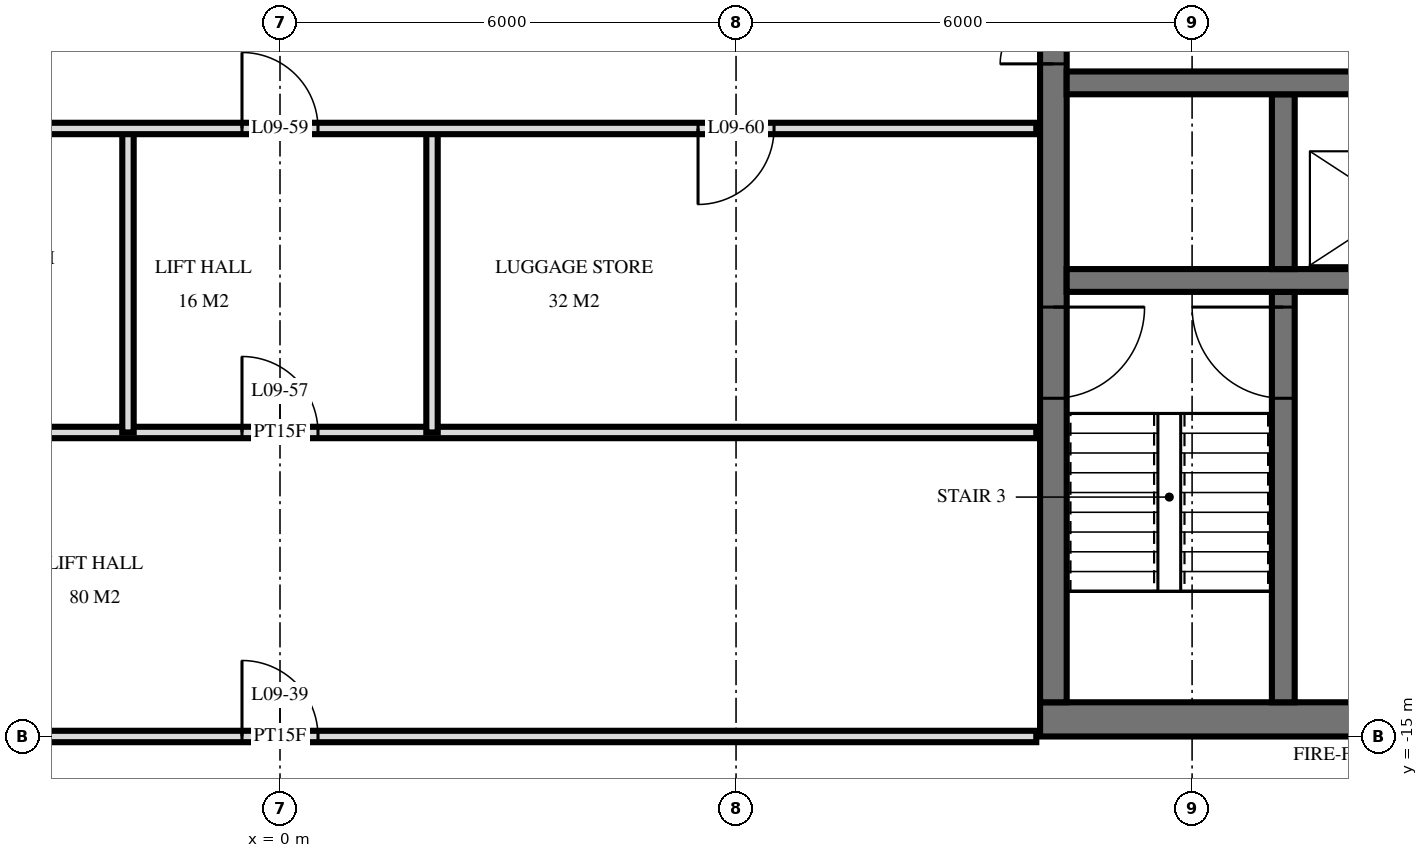
"""IFC4 building model, lengths in metres.
Left out: names, types, materials, properties, quantities, classifications, styles, units other than length and angle.
Written with IfcOpenShell. Run it as: python <this file> out.ifc"""

import sys

from ifc_helpers import new_model, si_unit, direction, frame, frame_2d, origin, place, context, subcontext, project, spatial, rectangle, extrude, element, fill, save


model = new_model("IFC4")
c1 = context("Model", 3, precision=1e-05, world=origin(), true_north=direction((0.0, 1.0)))
c2 = subcontext(c1, "Body", "Model", "MODEL_VIEW")
j1 = project(units=[si_unit("LENGTHUNIT", "METRE"), si_unit("PLANEANGLEUNIT", "RADIAN")], contexts=[c1])
p1 = place(None, origin())
s1 = spatial("IfcSite", under=j1, at=p1, CompositionType="ELEMENT")
p2 = place(p1, origin())
s2 = spatial("IfcBuilding", under=s1, at=p2, CompositionType="ELEMENT")
p3 = place(p2, frame((0.0, 0.0, 42.0)))
s3 = spatial("IfcBuildingStorey", under=s2, at=p3, CompositionType="ELEMENT", Elevation=42.0)
p4 = place(p3, frame((10.0, -14.775, 0.0), z_axis=(0.0, 0.0, 1.0), x_axis=(1.0, 0.0, 0.0)))
e1 = element("IfcWall", 1, at=p4, inside=s3, PredefinedType="SHEAR", context=c2, shape_type="SweptSolid", body=[
    extrude(rectangle(XDim=19.5, YDim=0.45, at=frame_2d((9.75, 0.0))), origin(), (0.0, 0.0, 1.0), 3.6),
])
p5 = place(p4, frame((7.1, 0.0, 0.0)))
e2 = element("IfcOpeningElement", 2, at=p5, cuts=e1, PredefinedType="OPENING", context=c2, shape_type="SweptSolid", body=[
    extrude(rectangle(XDim=1.2, YDim=2.1, at=frame_2d((0.6, 1.05))), frame((0.0, 0.235, 0.0), z_axis=(0.0, -1.0, 0.0), x_axis=(1.0, 0.0, 0.0)), (0.0, 0.0, 1.0), 0.47),
])
p6 = place(p4, frame((4.15, 0.0, 0.0)))
e3 = element("IfcOpeningElement", 3, at=p6, cuts=e1, PredefinedType="OPENING", context=c2, shape_type="SweptSolid", body=[
    extrude(rectangle(XDim=1.1, YDim=2.1, at=frame_2d((0.55, 1.05))), frame((0.0, 0.235, 0.0), z_axis=(0.0, -1.0, 0.0), x_axis=(1.0, 0.0, 0.0)), (0.0, 0.0, 1.0), 0.47),
])
p7 = place(p4, frame((10.1, 0.0, 0.0)))
e4 = element("IfcOpeningElement", 4, at=p7, cuts=e1, PredefinedType="OPENING", context=c2, shape_type="SweptSolid", body=[
    extrude(rectangle(XDim=0.9, YDim=2.1, at=frame_2d((0.45, 1.05))), frame((0.0, 0.235, 0.0), z_axis=(0.0, -1.0, 0.0), x_axis=(1.0, 0.0, 0.0)), (0.0, 0.0, 1.0), 0.47),
])
p8 = place(p4, frame((12.45, 0.0, 0.0)))
e5 = element("IfcOpeningElement", 5, at=p8, cuts=e1, PredefinedType="OPENING", context=c2, shape_type="SweptSolid", body=[
    extrude(rectangle(XDim=1.0, YDim=2.1, at=frame_2d((0.5, 1.05))), frame((0.0, 0.235, 0.0), z_axis=(0.0, -1.0, 0.0), x_axis=(1.0, 0.0, 0.0)), (0.0, 0.0, 1.0), 0.47),
])
p9 = place(p4, frame((14.913, 0.0, 0.0)))
e6 = element("IfcOpeningElement", 6, at=p9, cuts=e1, PredefinedType="OPENING", context=c2, shape_type="SweptSolid", body=[
    extrude(rectangle(XDim=1.0, YDim=2.1, at=frame_2d((0.5, 1.05))), frame((0.0, 0.235, 0.0), z_axis=(0.0, -1.0, 0.0), x_axis=(1.0, 0.0, 0.0)), (0.0, 0.0, 1.0), 0.47),
])
p10 = place(p4, frame((16.65, 0.0, 0.0)))
e7 = element("IfcOpeningElement", 7, at=p10, cuts=e1, PredefinedType="OPENING", context=c2, shape_type="SweptSolid", body=[
    extrude(rectangle(XDim=1.0, YDim=2.1, at=frame_2d((0.5, 1.05))), frame((0.0, 0.235, 0.0), z_axis=(0.0, -1.0, 0.0), x_axis=(1.0, 0.0, 0.0)), (0.0, 0.0, 1.0), 0.47),
])
p11 = place(p4, frame((18.025, 0.0, 0.0)))
e8 = element("IfcOpeningElement", 8, at=p11, cuts=e1, PredefinedType="OPENING", context=c2, shape_type="SweptSolid", body=[
    extrude(rectangle(XDim=1.0, YDim=2.1, at=frame_2d((0.5, 1.05))), frame((0.0, 0.235, 0.0), z_axis=(0.0, -1.0, 0.0), x_axis=(1.0, 0.0, 0.0)), (0.0, 0.0, 1.0), 0.47),
])
p12 = place(p3, frame((10.175, -14.55, 0.0), z_axis=(0.0, 0.0, 1.0), x_axis=(0.0, 1.0, 0.0)))
e9 = element("IfcWall", 9, at=p12, inside=s3, PredefinedType="SHEAR", context=c2, shape_type="SweptSolid", body=[
    extrude(rectangle(XDim=14.1, YDim=0.35, at=frame_2d((7.05, 0.0))), origin(), (0.0, 0.0, 1.0), 3.6),
])
p13 = place(p12, frame((8.4, 0.0, 0.0)))
e10 = element("IfcOpeningElement", 10, at=p13, cuts=e9, PredefinedType="OPENING", context=c2, shape_type="SweptSolid", body=[
    extrude(rectangle(XDim=1.4, YDim=2.4, at=frame_2d((0.7, 1.2))), frame((0.0, 0.185, 0.0), z_axis=(0.0, -1.0, 0.0), x_axis=(1.0, 0.0, 0.0)), (0.0, 0.0, 1.0), 0.37),
])
p14 = place(p12, frame((10.0, 0.0, 0.0)))
e11 = element("IfcOpeningElement", 11, at=p14, cuts=e9, PredefinedType="OPENING", context=c2, shape_type="SweptSolid", body=[
    extrude(rectangle(XDim=1.4, YDim=2.4, at=frame_2d((0.7, 1.2))), frame((0.0, 0.185, 0.0), z_axis=(0.0, -1.0, 0.0), x_axis=(1.0, 0.0, 0.0)), (0.0, 0.0, 1.0), 0.37),
])
p15 = place(p12, frame((4.0, 0.0, 0.0)))
e12 = element("IfcOpeningElement", 12, at=p15, cuts=e9, PredefinedType="OPENING", context=c2, shape_type="SweptSolid", body=[
    extrude(rectangle(XDim=1.2, YDim=2.1, at=frame_2d((0.6, 1.05))), frame((0.0, 0.185, 0.0), z_axis=(0.0, -1.0, 0.0), x_axis=(1.0, 0.0, 0.0)), (0.0, 0.0, 1.0), 0.37),
])
p16 = place(p3, frame((10.35, -6.4, 0.0), z_axis=(0.0, 0.0, 1.0), x_axis=(1.0, 0.0, 0.0)))
e13 = element("IfcWall", 13, at=p16, inside=s3, PredefinedType="SHEAR", context=c2, shape_type="SweptSolid", body=[
    extrude(rectangle(XDim=18.7, YDim=0.3, at=frame_2d((9.35, 0.0))), origin(), (0.0, 0.0, 1.0), 3.6),
])
p17 = place(p16, frame((14.65, 0.0, 0.0)))
e14 = element("IfcOpeningElement", 14, at=p17, cuts=e13, PredefinedType="OPENING", context=c2, shape_type="SweptSolid", body=[
    extrude(rectangle(XDim=1.1, YDim=2.1, at=frame_2d((0.55, 1.05))), frame((0.0, 0.16, 0.0), z_axis=(0.0, -1.0, 0.0), x_axis=(1.0, 0.0, 0.0)), (0.0, 0.0, 1.0), 0.32),
])
p18 = place(p16, frame((17.05, 0.0, 0.0)))
e15 = element("IfcOpeningElement", 15, at=p18, cuts=e13, PredefinedType="OPENING", context=c2, shape_type="SweptSolid", body=[
    extrude(rectangle(XDim=1.1, YDim=2.1, at=frame_2d((0.55, 1.05))), frame((0.0, 0.16, 0.0), z_axis=(0.0, -1.0, 0.0), x_axis=(1.0, 0.0, 0.0)), (0.0, 0.0, 1.0), 0.32),
])
p19 = place(p16, frame((6.8, 0.0, 0.0)))
e16 = element("IfcOpeningElement", 16, at=p19, cuts=e13, PredefinedType="OPENING", context=c2, shape_type="SweptSolid", body=[
    extrude(rectangle(XDim=1.1, YDim=2.1, at=frame_2d((0.55, 1.05))), frame((0.0, 0.16, 0.0), z_axis=(0.0, -1.0, 0.0), x_axis=(1.0, 0.0, 0.0)), (0.0, 0.0, 1.0), 0.32),
])
p20 = place(p16, frame((12.1, 0.0, 0.0)))
e17 = element("IfcOpeningElement", 17, at=p20, cuts=e13, PredefinedType="OPENING", context=c2, shape_type="SweptSolid", body=[
    extrude(rectangle(XDim=1.0, YDim=2.1, at=frame_2d((0.5, 1.05))), frame((0.0, 0.16, 0.0), z_axis=(0.0, -1.0, 0.0), x_axis=(1.0, 0.0, 0.0)), (0.0, 0.0, 1.0), 0.32),
])
p21 = place(p3, frame((10.35, -9.0, 0.0), z_axis=(0.0, 0.0, 1.0), x_axis=(1.0, 0.0, 0.0)))
e18 = element("IfcWall", 18, at=p21, inside=s3, PredefinedType="SHEAR", context=c2, shape_type="SweptSolid", body=[
    extrude(rectangle(XDim=18.7, YDim=0.3, at=frame_2d((9.35, 0.0))), origin(), (0.0, 0.0, 1.0), 3.6),
])
p22 = place(p21, frame((3.8, 0.0, 0.0)))
e19 = element("IfcOpeningElement", 19, at=p22, cuts=e18, PredefinedType="OPENING", context=c2, shape_type="SweptSolid", body=[
    extrude(rectangle(XDim=1.1, YDim=2.1, at=frame_2d((0.55, 1.05))), frame((0.0, 0.16, 0.0), z_axis=(0.0, -1.0, 0.0), x_axis=(1.0, 0.0, 0.0)), (0.0, 0.0, 1.0), 0.32),
])
p23 = place(p3, frame((13.2, -8.85, 0.0), z_axis=(0.0, 0.0, 1.0), x_axis=(0.0, 1.0, 0.0)))
e20 = element("IfcWall", 20, at=p23, inside=s3, PredefinedType="SHEAR", context=c2, shape_type="SweptSolid", body=[
    extrude(rectangle(XDim=2.3, YDim=0.3, at=frame_2d((1.15, 0.0))), origin(), (0.0, 0.0, 1.0), 3.6),
])
p24 = place(p3, frame((13.2, -14.55, 0.0), z_axis=(0.0, 0.0, 1.0), x_axis=(0.0, 1.0, 0.0)))
e21 = element("IfcWall", 21, at=p24, inside=s3, PredefinedType="SHEAR", context=c2, shape_type="SweptSolid", body=[
    extrude(rectangle(XDim=5.4, YDim=0.3, at=frame_2d((2.7, 0.0))), origin(), (0.0, 0.0, 1.0), 3.6),
])
p25 = place(p24, frame((4.0, 0.0, 0.0)))
e22 = element("IfcOpeningElement", 22, at=p25, cuts=e21, PredefinedType="OPENING", context=c2, shape_type="SweptSolid", body=[
    extrude(rectangle(XDim=1.2, YDim=2.1, at=frame_2d((0.6, 1.05))), frame((0.0, 0.16, 0.0), z_axis=(0.0, -1.0, 0.0), x_axis=(1.0, 0.0, 0.0)), (0.0, 0.0, 1.0), 0.32),
])
for number, where, z_axis, x_axis in (
    (23, (2.0, -11.0, 0.0), (0.0, 0.0, 1.0), (0.0, 1.0, 0.0)),
    (24, (-2.0, -11.0, 0.0), (0.0, 0.0, 1.0), (0.0, 1.0, 0.0)),
):
    element("IfcWall", number, at=place(p3, frame(where, z_axis=z_axis, x_axis=x_axis)), inside=s3, PredefinedType="PARTITIONING", context=c2, shape_type="SweptSolid", body=[
        extrude(rectangle(XDim=4.0, YDim=0.15, at=frame_2d((2.0, 0.0))), origin(), (0.0, 0.0, 1.0), 3.32),
    ])
p26 = place(p3, frame((-9.95, -15.0, 0.0), z_axis=(0.0, 0.0, 1.0), x_axis=(1.0, 0.0, 0.0)))
e25 = element("IfcWall", 25, at=p26, inside=s3, PredefinedType="PARTITIONING", context=c2, shape_type="SweptSolid", body=[
    extrude(rectangle(XDim=19.9, YDim=0.15, at=frame_2d((9.95, 0.0))), origin(), (0.0, 0.0, 1.0), 2.684),
])
p27 = place(p26, frame((9.45, 0.0, 0.0)))
e26 = element("IfcOpeningElement", 26, at=p27, cuts=e25, PredefinedType="OPENING", context=c2, shape_type="SweptSolid", body=[
    extrude(rectangle(XDim=1.0, YDim=2.1, at=frame_2d((0.5, 1.05))), frame((0.0, 0.085, 0.0), z_axis=(0.0, -1.0, 0.0), x_axis=(1.0, 0.0, 0.0)), (0.0, 0.0, 1.0), 0.17),
])
p28 = place(p3, frame((-9.95, -11.0, 0.0), z_axis=(0.0, 0.0, 1.0), x_axis=(1.0, 0.0, 0.0)))
e27 = element("IfcWall", 27, at=p28, inside=s3, PredefinedType="PARTITIONING", context=c2, shape_type="SweptSolid", body=[
    extrude(rectangle(XDim=19.9, YDim=0.15, at=frame_2d((9.95, 0.0))), origin(), (0.0, 0.0, 1.0), 3.32),
])
p29 = place(p28, frame((9.45, 0.0, 0.0)))
e28 = element("IfcOpeningElement", 28, at=p29, cuts=e27, PredefinedType="OPENING", context=c2, shape_type="SweptSolid", body=[
    extrude(rectangle(XDim=1.0, YDim=2.1, at=frame_2d((0.5, 1.05))), frame((0.0, 0.085, 0.0), z_axis=(0.0, -1.0, 0.0), x_axis=(1.0, 0.0, 0.0)), (0.0, 0.0, 1.0), 0.17),
])
p30 = place(p28, frame((3.45, 0.0, 0.0)))
e29 = element("IfcOpeningElement", 29, at=p30, cuts=e27, PredefinedType="OPENING", context=c2, shape_type="SweptSolid", body=[
    extrude(rectangle(XDim=1.0, YDim=2.1, at=frame_2d((0.5, 1.05))), frame((0.0, 0.085, 0.0), z_axis=(0.0, -1.0, 0.0), x_axis=(1.0, 0.0, 0.0)), (0.0, 0.0, 1.0), 0.17),
])
p31 = place(p3, frame((-9.95, -7.0, 0.0), z_axis=(0.0, 0.0, 1.0), x_axis=(1.0, 0.0, 0.0)))
e30 = element("IfcWall", 30, at=p31, inside=s3, PredefinedType="PARTITIONING", context=c2, shape_type="SweptSolid", body=[
    extrude(rectangle(XDim=19.9, YDim=0.15, at=frame_2d((9.95, 0.0))), origin(), (0.0, 0.0, 1.0), 3.32),
])
p32 = place(p31, frame((9.45, 0.0, 0.0)))
e31 = element("IfcOpeningElement", 31, at=p32, cuts=e30, PredefinedType="OPENING", context=c2, shape_type="SweptSolid", body=[
    extrude(rectangle(XDim=1.0, YDim=2.1, at=frame_2d((0.5, 1.05))), frame((0.0, 0.085, 0.0), z_axis=(0.0, -1.0, 0.0), x_axis=(1.0, 0.0, 0.0)), (0.0, 0.0, 1.0), 0.17),
])
p33 = place(p31, frame((15.45, 0.0, 0.0)))
e32 = element("IfcOpeningElement", 32, at=p33, cuts=e30, PredefinedType="OPENING", context=c2, shape_type="SweptSolid", body=[
    extrude(rectangle(XDim=1.0, YDim=2.1, at=frame_2d((0.5, 1.05))), frame((0.0, 0.085, 0.0), z_axis=(0.0, -1.0, 0.0), x_axis=(1.0, 0.0, 0.0)), (0.0, 0.0, 1.0), 0.17),
])
p34 = place(p13, origin())
e33 = element("IfcDoor", 33, at=p34, inside=s3, OperationType="DOUBLE_DOOR_SINGLE_SWING", PredefinedType="DOOR", context=c2, shape_type="SweptSolid", body=[
    extrude(rectangle(XDim=1.4, YDim=2.4, at=frame_2d((0.7, 1.2))), frame((0.0, 0.025, 0.0), z_axis=(0.0, -1.0, 0.0), x_axis=(1.0, 0.0, 0.0)), (0.0, 0.0, 1.0), 0.05),
])
fill(e10, e33)
p35 = place(p15, frame((0.6, 0.0, 0.0), z_axis=(0.0, 0.0, 1.0), x_axis=(-1.0, 0.0, 0.0)))
e34 = element("IfcDoor", 34, at=p35, inside=s3, OperationType="SINGLE_SWING_RIGHT", PredefinedType="DOOR", context=c2, shape_type="SweptSolid", body=[
    extrude(rectangle(XDim=1.2, YDim=2.1, at=frame_2d((0.0, 1.05))), frame((0.0, -0.025, 0.0), z_axis=(0.0, 1.0, 0.0), x_axis=(-1.0, 0.0, 0.0)), (0.0, 0.0, 1.0), 0.05),
])
fill(e12, e34)
p36 = place(p25, origin())
e35 = element("IfcDoor", 35, at=p36, inside=s3, OperationType="SINGLE_SWING_LEFT", PredefinedType="DOOR", context=c2, shape_type="SweptSolid", body=[
    extrude(rectangle(XDim=1.2, YDim=2.1, at=frame_2d((0.6, 1.05))), frame((0.0, 0.025, 0.0), z_axis=(0.0, -1.0, 0.0), x_axis=(1.0, 0.0, 0.0)), (0.0, 0.0, 1.0), 0.05),
])
fill(e22, e35)
p37 = place(p27, origin())
e36 = element("IfcDoor", 36, at=p37, inside=s3, OperationType="SINGLE_SWING_RIGHT", PredefinedType="DOOR", context=c2, shape_type="SweptSolid", body=[
    extrude(rectangle(XDim=1.0, YDim=2.1, at=frame_2d((0.5, 1.05))), frame((0.0, 0.025, 0.0), z_axis=(0.0, -1.0, 0.0), x_axis=(1.0, 0.0, 0.0)), (0.0, 0.0, 1.0), 0.05),
])
fill(e26, e36)
p38 = place(p29, origin())
e37 = element("IfcDoor", 37, at=p38, inside=s3, OperationType="SINGLE_SWING_RIGHT", PredefinedType="DOOR", context=c2, shape_type="SweptSolid", body=[
    extrude(rectangle(XDim=1.0, YDim=2.1, at=frame_2d((0.5, 1.05))), frame((0.0, 0.025, 0.0), z_axis=(0.0, -1.0, 0.0), x_axis=(1.0, 0.0, 0.0)), (0.0, 0.0, 1.0), 0.05),
])
fill(e28, e37)
p39 = place(p32, origin())
e38 = element("IfcDoor", 38, at=p39, inside=s3, OperationType="SINGLE_SWING_RIGHT", PredefinedType="DOOR", context=c2, shape_type="SweptSolid", body=[
    extrude(rectangle(XDim=1.0, YDim=2.1, at=frame_2d((0.5, 1.05))), frame((0.0, 0.025, 0.0), z_axis=(0.0, -1.0, 0.0), x_axis=(1.0, 0.0, 0.0)), (0.0, 0.0, 1.0), 0.05),
])
fill(e31, e38)
p40 = place(p33, frame((0.5, 0.0, 0.0), z_axis=(0.0, 0.0, 1.0), x_axis=(-1.0, 0.0, 0.0)))
e39 = element("IfcDoor", 39, at=p40, inside=s3, OperationType="SINGLE_SWING_LEFT", PredefinedType="DOOR", context=c2, shape_type="SweptSolid", body=[
    extrude(rectangle(XDim=1.0, YDim=2.1, at=frame_2d((0.0, 1.05))), frame((0.0, -0.025, 0.0), z_axis=(0.0, 1.0, 0.0), x_axis=(-1.0, 0.0, 0.0)), (0.0, 0.0, 1.0), 0.05),
])
fill(e32, e39)
save(model, sys.argv[1])
